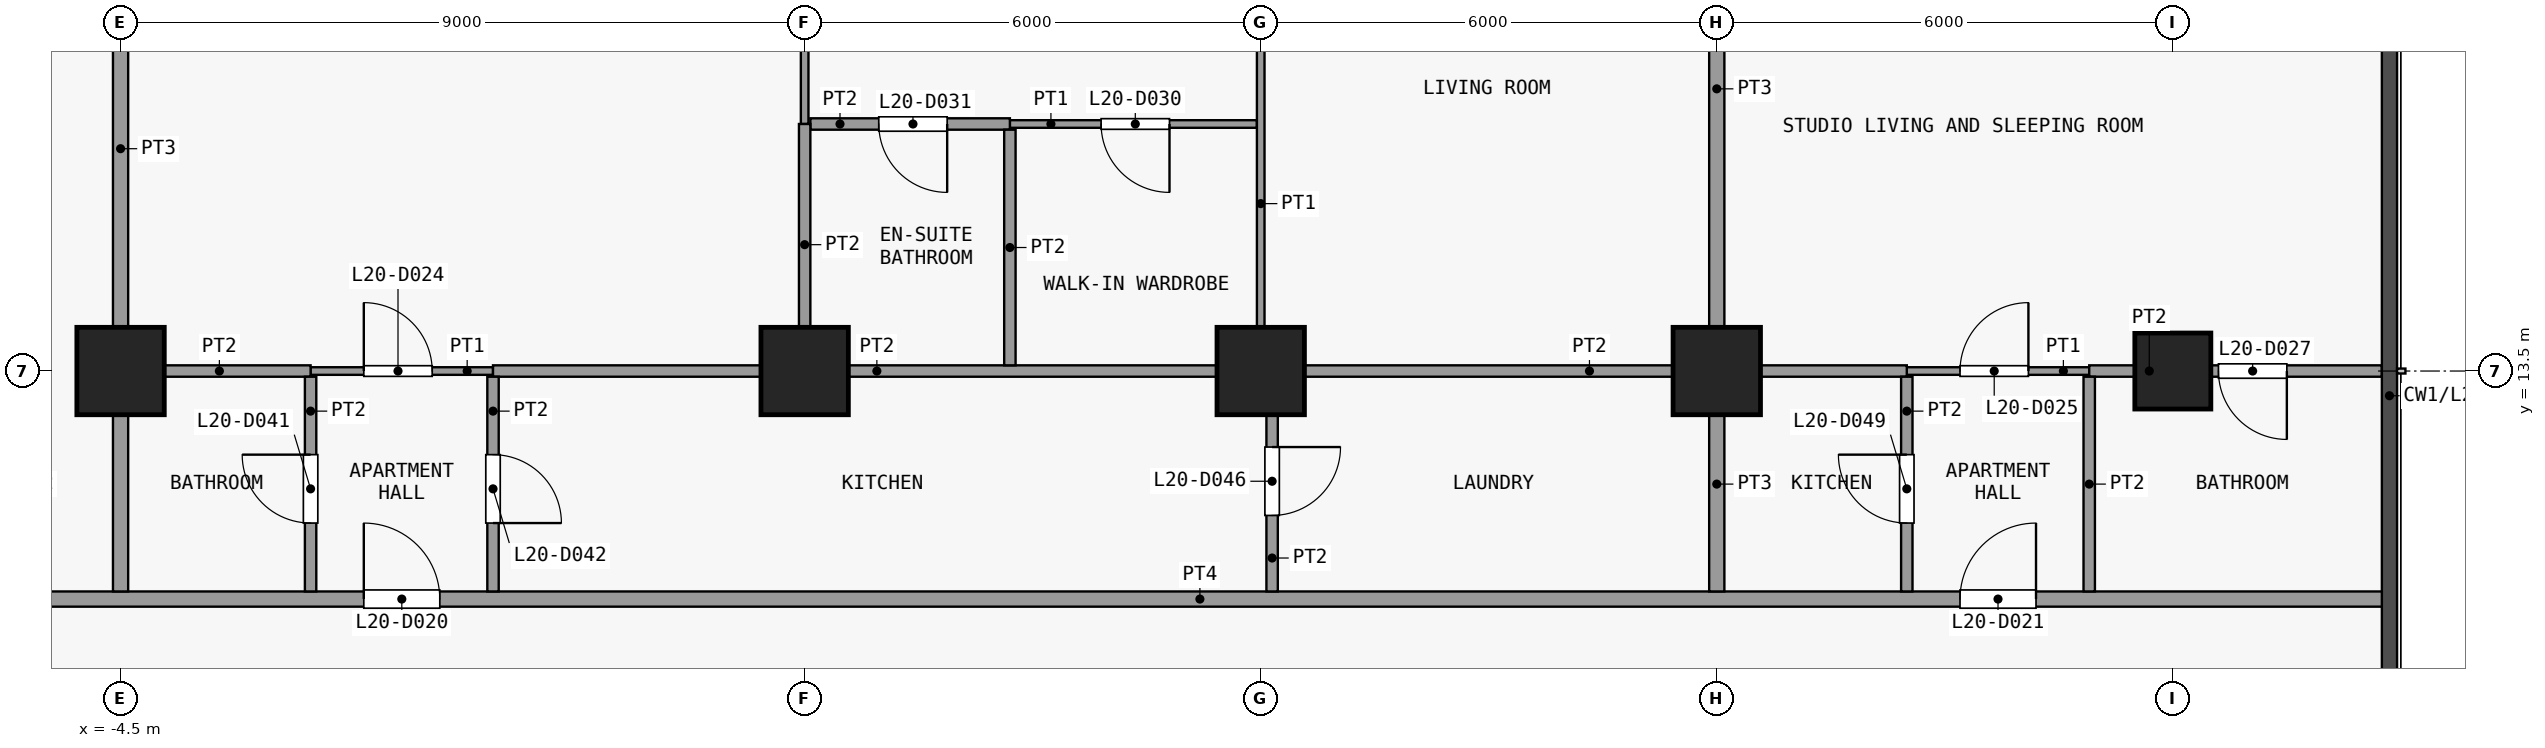
"""IFC4 building model, lengths in metres.
Left out: names, types, materials, properties, quantities, classifications, styles, units other than length and angle.
Written with IfcOpenShell. Run it as: python <this file> out.ifc"""

import sys

from ifc_helpers import new_model, si_unit, direction, frame, frame_2d, origin, origin_2d, place, context, subcontext, project, spatial, rectangle, extrude, element, fill, save


model = new_model("IFC4")
c1 = context("Model", 3, precision=1e-05, world=origin(), true_north=direction((0.0, 1.0)))
c2 = subcontext(c1, "Body", "Model", "MODEL_VIEW")
j1 = project(units=[si_unit("LENGTHUNIT", "METRE"), si_unit("PLANEANGLEUNIT", "RADIAN")], contexts=[c1])
p1 = place(None, origin())
s1 = spatial("IfcSite", under=j1, at=p1, CompositionType="ELEMENT")
p2 = place(p1, origin())
s2 = spatial("IfcBuilding", under=s1, at=p2, CompositionType="ELEMENT")
p3 = place(p2, frame((0.0, 0.0, 84.7)))
s3 = spatial("IfcBuildingStorey", under=s2, at=p3, CompositionType="ELEMENT", Elevation=84.7)
for number, where, z_axis, x_axis in (
    (1, (-4.5, 13.5, 0.0), (0.0, 0.0, 1.0), (1.0, 0.0, 0.0)),
    (2, (4.5, 13.5, 0.0), (0.0, 0.0, 1.0), (1.0, 0.0, 0.0)),
    (3, (10.5, 13.5, 0.0), (0.0, 0.0, 1.0), (1.0, 0.0, 0.0)),
    (4, (16.5, 13.5, 0.0), (0.0, 0.0, 1.0), (1.0, 0.0, 0.0)),
):
    element("IfcColumn", number, at=place(p3, frame(where, z_axis=z_axis, x_axis=x_axis)), inside=s3, PredefinedType="COLUMN", context=c2, shape_type="SweptSolid", body=[
        extrude(rectangle(XDim=1.15, YDim=1.15, at=origin_2d()), origin(), (0.0, 0.0, 1.0), 3.6),
    ])
p4 = place(p3, frame((22.5, 13.5, 0.0), z_axis=(0.0, 0.0, 1.0), x_axis=(1.0, 0.0, 0.0)))
e5 = element("IfcColumn", 5, at=p4, inside=s3, PredefinedType="COLUMN", context=c2, shape_type="SweptSolid", body=[
    extrude(rectangle(XDim=1.0, YDim=1.0, at=origin_2d()), origin(), (0.0, 0.0, 1.0), 3.6),
])
p5 = place(p3, frame((-23.85, 10.5, 0.0), z_axis=(0.0, 0.0, 1.0), x_axis=(1.0, 0.0, 0.0)))
e6 = element("IfcWall", 6, at=p5, inside=s3, PredefinedType="PARTITIONING", context=c2, shape_type="SweptSolid", body=[
    extrude(rectangle(XDim=49.2, YDim=0.2, at=frame_2d((24.6, 0.0))), origin(), (0.0, 0.0, 1.0), 3.3),
])
p6 = place(p5, frame((5.55, 0.0, 0.0)))
e7 = element("IfcOpeningElement", 7, at=p6, cuts=e6, PredefinedType="OPENING", context=c2, shape_type="SweptSolid", body=[
    extrude(rectangle(XDim=1.0, YDim=2.1, at=frame_2d((0.5, 1.05))), frame((0.0, 0.11, 0.0), z_axis=(0.0, -1.0, 0.0), x_axis=(1.0, 0.0, 0.0)), (0.0, 0.0, 1.0), 0.22),
])
p7 = place(p5, frame((14.05, 0.0, 0.0)))
e8 = element("IfcOpeningElement", 8, at=p7, cuts=e6, PredefinedType="OPENING", context=c2, shape_type="SweptSolid", body=[
    extrude(rectangle(XDim=1.0, YDim=2.1, at=frame_2d((0.5, 1.05))), frame((0.0, 0.11, 0.0), z_axis=(0.0, -1.0, 0.0), x_axis=(1.0, 0.0, 0.0)), (0.0, 0.0, 1.0), 0.22),
])
p8 = place(p5, frame((22.55, 0.0, 0.0)))
e9 = element("IfcOpeningElement", 9, at=p8, cuts=e6, PredefinedType="OPENING", context=c2, shape_type="SweptSolid", body=[
    extrude(rectangle(XDim=1.0, YDim=2.1, at=frame_2d((0.5, 1.05))), frame((0.0, 0.11, 0.0), z_axis=(0.0, -1.0, 0.0), x_axis=(1.0, 0.0, 0.0)), (0.0, 0.0, 1.0), 0.22),
])
p9 = place(p5, frame((43.55, 0.0, 0.0)))
e10 = element("IfcOpeningElement", 10, at=p9, cuts=e6, PredefinedType="OPENING", context=c2, shape_type="SweptSolid", body=[
    extrude(rectangle(XDim=1.0, YDim=2.1, at=frame_2d((0.5, 1.05))), frame((0.0, 0.11, 0.0), z_axis=(0.0, -1.0, 0.0), x_axis=(1.0, 0.0, 0.0)), (0.0, 0.0, 1.0), 0.22),
])
p10 = place(p3, frame((-2.0, 13.5, 0.0), z_axis=(0.0, 0.0, 1.0), x_axis=(1.0, 0.0, 0.0)))
e11 = element("IfcWall", 11, at=p10, inside=s3, PredefinedType="PARTITIONING", context=c2, shape_type="SweptSolid", body=[
    extrude(rectangle(XDim=2.4, YDim=0.1, at=frame_2d((1.2, 0.0))), origin(), (0.0, 0.0, 1.0), 3.3),
])
p11 = place(p10, frame((0.7, 0.0, 0.0)))
e12 = element("IfcOpeningElement", 12, at=p11, cuts=e11, PredefinedType="OPENING", context=c2, shape_type="SweptSolid", body=[
    extrude(rectangle(XDim=0.9, YDim=2.1, at=frame_2d((0.45, 1.05))), frame((0.0, 0.06, 0.0), z_axis=(0.0, -1.0, 0.0), x_axis=(1.0, 0.0, 0.0)), (0.0, 0.0, 1.0), 0.12),
])
p12 = place(p3, frame((19.0, 13.5, 0.0), z_axis=(0.0, 0.0, 1.0), x_axis=(1.0, 0.0, 0.0)))
e13 = element("IfcWall", 13, at=p12, inside=s3, PredefinedType="PARTITIONING", context=c2, shape_type="SweptSolid", body=[
    extrude(rectangle(XDim=2.4, YDim=0.1, at=frame_2d((1.2, 0.0))), origin(), (0.0, 0.0, 1.0), 3.3),
])
p13 = place(p12, frame((0.7, 0.0, 0.0)))
e14 = element("IfcOpeningElement", 14, at=p13, cuts=e13, PredefinedType="OPENING", context=c2, shape_type="SweptSolid", body=[
    extrude(rectangle(XDim=0.9, YDim=2.1, at=frame_2d((0.45, 1.05))), frame((0.0, 0.06, 0.0), z_axis=(0.0, -1.0, 0.0), x_axis=(1.0, 0.0, 0.0)), (0.0, 0.0, 1.0), 0.12),
])
p14 = place(p3, frame((-4.4, 13.5, 0.0), z_axis=(0.0, 0.0, 1.0), x_axis=(1.0, 0.0, 0.0)))
e15 = element("IfcWall", 15, at=p14, inside=s3, PredefinedType="PARTITIONING", context=c2, shape_type="SweptSolid", body=[
    extrude(rectangle(XDim=2.4, YDim=0.15, at=frame_2d((1.2, 0.0))), origin(), (0.0, 0.0, 1.0), 3.3),
])
p15 = place(p3, frame((0.4, 13.5, 0.0), z_axis=(0.0, 0.0, 1.0), x_axis=(1.0, 0.0, 0.0)))
e16 = element("IfcWall", 16, at=p15, inside=s3, PredefinedType="PARTITIONING", context=c2, shape_type="SweptSolid", body=[
    extrude(rectangle(XDim=10.1, YDim=0.15, at=frame_2d((5.05, 0.0))), origin(), (0.0, 0.0, 1.0), 3.3),
])
p16 = place(p3, frame((10.65, 13.5, 0.0), z_axis=(0.0, 0.0, 1.0), x_axis=(1.0, 0.0, 0.0)))
e17 = element("IfcWall", 17, at=p16, inside=s3, PredefinedType="PARTITIONING", context=c2, shape_type="SweptSolid", body=[
    extrude(rectangle(XDim=8.35, YDim=0.15, at=frame_2d((4.175, 0.0))), origin(), (0.0, 0.0, 1.0), 3.3),
])
p17 = place(p3, frame((21.4, 13.5, 0.0), z_axis=(0.0, 0.0, 1.0), x_axis=(1.0, 0.0, 0.0)))
e18 = element("IfcWall", 18, at=p17, inside=s3, PredefinedType="PARTITIONING", context=c2, shape_type="SweptSolid", body=[
    extrude(rectangle(XDim=3.85, YDim=0.15, at=frame_2d((1.925, 0.0))), origin(), (0.0, 0.0, 1.0), 3.3),
])
p18 = place(p17, frame((1.7, 0.0, 0.0)))
e19 = element("IfcOpeningElement", 19, at=p18, cuts=e18, PredefinedType="OPENING", context=c2, shape_type="SweptSolid", body=[
    extrude(rectangle(XDim=0.9, YDim=2.1, at=frame_2d((0.45, 1.05))), frame((0.0, 0.085, 0.0), z_axis=(0.0, -1.0, 0.0), x_axis=(1.0, 0.0, 0.0)), (0.0, 0.0, 1.0), 0.17),
])
p19 = place(p3, frame((7.2, 16.75, 0.0), z_axis=(0.0, 0.0, 1.0), x_axis=(1.0, 0.0, 0.0)))
e20 = element("IfcWall", 20, at=p19, inside=s3, PredefinedType="PARTITIONING", context=c2, shape_type="SweptSolid", body=[
    extrude(rectangle(XDim=3.25, YDim=0.1, at=frame_2d((1.625, 0.0))), origin(), (0.0, 0.0, 1.0), 3.3),
])
p20 = place(p19, frame((1.2, 0.0, 0.0)))
e21 = element("IfcOpeningElement", 21, at=p20, cuts=e20, PredefinedType="OPENING", context=c2, shape_type="SweptSolid", body=[
    extrude(rectangle(XDim=0.9, YDim=2.1, at=frame_2d((0.45, 1.05))), frame((0.0, 0.06, 0.0), z_axis=(0.0, -1.0, 0.0), x_axis=(1.0, 0.0, 0.0)), (0.0, 0.0, 1.0), 0.12),
])
p21 = place(p3, frame((4.575, 16.75, 0.0), z_axis=(0.0, 0.0, 1.0), x_axis=(1.0, 0.0, 0.0)))
e22 = element("IfcWall", 22, at=p21, inside=s3, PredefinedType="PARTITIONING", context=c2, shape_type="SweptSolid", body=[
    extrude(rectangle(XDim=2.625, YDim=0.15, at=frame_2d((1.312, 0.0))), origin(), (0.0, 0.0, 1.0), 3.3),
])
p22 = place(p21, frame((0.9, 0.0, 0.0)))
e23 = element("IfcOpeningElement", 23, at=p22, cuts=e22, PredefinedType="OPENING", context=c2, shape_type="SweptSolid", body=[
    extrude(rectangle(XDim=0.9, YDim=2.1, at=frame_2d((0.45, 1.05))), frame((0.0, 0.085, 0.0), z_axis=(0.0, -1.0, 0.0), x_axis=(1.0, 0.0, 0.0)), (0.0, 0.0, 1.0), 0.17),
])
p23 = place(p3, frame((-4.5, 10.6, 0.0), z_axis=(0.0, 0.0, 1.0), x_axis=(0.0, 1.0, 0.0)))
e24 = element("IfcWall", 24, at=p23, inside=s3, PredefinedType="PARTITIONING", context=c2, shape_type="SweptSolid", body=[
    extrude(rectangle(XDim=11.65, YDim=0.2, at=frame_2d((5.825, 0.0))), origin(), (0.0, 0.0, 1.0), 3.3),
])
p24 = place(p3, frame((-2.0, 10.6, 0.0), z_axis=(0.0, 0.0, 1.0), x_axis=(0.0, 1.0, 0.0)))
e25 = element("IfcWall", 25, at=p24, inside=s3, PredefinedType="PARTITIONING", context=c2, shape_type="SweptSolid", body=[
    extrude(rectangle(XDim=2.825, YDim=0.15, at=frame_2d((1.413, 0.0))), origin(), (0.0, 0.0, 1.0), 3.3),
])
p25 = place(p24, frame((0.9, 0.0, 0.0)))
e26 = element("IfcOpeningElement", 26, at=p25, cuts=e25, PredefinedType="OPENING", context=c2, shape_type="SweptSolid", body=[
    extrude(rectangle(XDim=0.9, YDim=2.1, at=frame_2d((0.45, 1.05))), frame((0.0, 0.085, 0.0), z_axis=(0.0, -1.0, 0.0), x_axis=(1.0, 0.0, 0.0)), (0.0, 0.0, 1.0), 0.17),
])
p26 = place(p3, frame((0.4, 10.6, 0.0), z_axis=(0.0, 0.0, 1.0), x_axis=(0.0, 1.0, 0.0)))
e27 = element("IfcWall", 27, at=p26, inside=s3, PredefinedType="PARTITIONING", context=c2, shape_type="SweptSolid", body=[
    extrude(rectangle(XDim=2.825, YDim=0.15, at=frame_2d((1.413, 0.0))), origin(), (0.0, 0.0, 1.0), 3.3),
])
p27 = place(p26, frame((0.9, 0.0, 0.0)))
e28 = element("IfcOpeningElement", 28, at=p27, cuts=e27, PredefinedType="OPENING", context=c2, shape_type="SweptSolid", body=[
    extrude(rectangle(XDim=0.9, YDim=2.1, at=frame_2d((0.45, 1.05))), frame((0.0, 0.085, 0.0), z_axis=(0.0, -1.0, 0.0), x_axis=(1.0, 0.0, 0.0)), (0.0, 0.0, 1.0), 0.17),
])
p28 = place(p3, frame((4.5, 16.75, 0.0), z_axis=(0.0, 0.0, 1.0), x_axis=(0.0, 1.0, 0.0)))
e29 = element("IfcWall", 29, at=p28, inside=s3, PredefinedType="PARTITIONING", context=c2, shape_type="SweptSolid", body=[
    extrude(rectangle(XDim=5.5, YDim=0.1, at=frame_2d((2.75, 0.0))), origin(), (0.0, 0.0, 1.0), 3.3),
])
p29 = place(p28, frame((3.4, 0.0, 0.0)))
e30 = element("IfcOpeningElement", 30, at=p29, cuts=e29, PredefinedType="OPENING", context=c2, shape_type="SweptSolid", body=[
    extrude(rectangle(XDim=0.9, YDim=2.1, at=frame_2d((0.45, 1.05))), frame((0.0, 0.06, 0.0), z_axis=(0.0, -1.0, 0.0), x_axis=(1.0, 0.0, 0.0)), (0.0, 0.0, 1.0), 0.12),
])
p30 = place(p3, frame((4.5, 13.575, 0.0), z_axis=(0.0, 0.0, 1.0), x_axis=(0.0, 1.0, 0.0)))
e31 = element("IfcWall", 31, at=p30, inside=s3, PredefinedType="PARTITIONING", context=c2, shape_type="SweptSolid", body=[
    extrude(rectangle(XDim=3.175, YDim=0.15, at=frame_2d((1.587, 0.0))), origin(), (0.0, 0.0, 1.0), 3.3),
])
p31 = place(p3, frame((7.2, 13.575, 0.0), z_axis=(0.0, 0.0, 1.0), x_axis=(0.0, 1.0, 0.0)))
e32 = element("IfcWall", 32, at=p31, inside=s3, PredefinedType="PARTITIONING", context=c2, shape_type="SweptSolid", body=[
    extrude(rectangle(XDim=3.1, YDim=0.15, at=frame_2d((1.55, 0.0))), origin(), (0.0, 0.0, 1.0), 3.3),
])
p32 = place(p3, frame((10.5, 13.575, 0.0), z_axis=(0.0, 0.0, 1.0), x_axis=(0.0, 1.0, 0.0)))
e33 = element("IfcWall", 33, at=p32, inside=s3, PredefinedType="PARTITIONING", context=c2, shape_type="SweptSolid", body=[
    extrude(rectangle(XDim=7.275, YDim=0.1, at=frame_2d((3.638, 0.0))), origin(), (0.0, 0.0, 1.0), 3.3),
])
p33 = place(p32, frame((4.375, 0.0, 0.0)))
e34 = element("IfcOpeningElement", 34, at=p33, cuts=e33, PredefinedType="OPENING", context=c2, shape_type="SweptSolid", body=[
    extrude(rectangle(XDim=0.9, YDim=2.1, at=frame_2d((0.45, 1.05))), frame((0.0, 0.06, 0.0), z_axis=(0.0, -1.0, 0.0), x_axis=(1.0, 0.0, 0.0)), (0.0, 0.0, 1.0), 0.12),
])
p34 = place(p3, frame((10.65, 10.6, 0.0), z_axis=(0.0, 0.0, 1.0), x_axis=(0.0, 1.0, 0.0)))
e35 = element("IfcWall", 35, at=p34, inside=s3, PredefinedType="PARTITIONING", context=c2, shape_type="SweptSolid", body=[
    extrude(rectangle(XDim=2.825, YDim=0.15, at=frame_2d((1.413, 0.0))), origin(), (0.0, 0.0, 1.0), 3.3),
])
p35 = place(p34, frame((1.0, 0.0, 0.0)))
e36 = element("IfcOpeningElement", 36, at=p35, cuts=e35, PredefinedType="OPENING", context=c2, shape_type="SweptSolid", body=[
    extrude(rectangle(XDim=0.9, YDim=2.1, at=frame_2d((0.45, 1.05))), frame((0.0, 0.085, 0.0), z_axis=(0.0, -1.0, 0.0), x_axis=(1.0, 0.0, 0.0)), (0.0, 0.0, 1.0), 0.17),
])
p36 = place(p3, frame((16.5, 10.6, 0.0), z_axis=(0.0, 0.0, 1.0), x_axis=(0.0, 1.0, 0.0)))
e37 = element("IfcWall", 37, at=p36, inside=s3, PredefinedType="PARTITIONING", context=c2, shape_type="SweptSolid", body=[
    extrude(rectangle(XDim=2.825, YDim=0.2, at=frame_2d((1.413, 0.0))), origin(), (0.0, 0.0, 1.0), 3.3),
])
p37 = place(p3, frame((16.5, 13.575, 0.0), z_axis=(0.0, 0.0, 1.0), x_axis=(0.0, 1.0, 0.0)))
e38 = element("IfcWall", 38, at=p37, inside=s3, PredefinedType="PARTITIONING", context=c2, shape_type="SweptSolid", body=[
    extrude(rectangle(XDim=7.275, YDim=0.2, at=frame_2d((3.638, 0.0))), origin(), (0.0, 0.0, 1.0), 3.3),
])
p38 = place(p3, frame((19.0, 10.6, 0.0), z_axis=(0.0, 0.0, 1.0), x_axis=(0.0, 1.0, 0.0)))
e39 = element("IfcWall", 39, at=p38, inside=s3, PredefinedType="PARTITIONING", context=c2, shape_type="SweptSolid", body=[
    extrude(rectangle(XDim=2.825, YDim=0.15, at=frame_2d((1.413, 0.0))), origin(), (0.0, 0.0, 1.0), 3.3),
])
p39 = place(p38, frame((0.9, 0.0, 0.0)))
e40 = element("IfcOpeningElement", 40, at=p39, cuts=e39, PredefinedType="OPENING", context=c2, shape_type="SweptSolid", body=[
    extrude(rectangle(XDim=0.9, YDim=2.1, at=frame_2d((0.45, 1.05))), frame((0.0, 0.085, 0.0), z_axis=(0.0, -1.0, 0.0), x_axis=(1.0, 0.0, 0.0)), (0.0, 0.0, 1.0), 0.17),
])
p40 = place(p3, frame((21.4, 10.6, 0.0), z_axis=(0.0, 0.0, 1.0), x_axis=(0.0, 1.0, 0.0)))
e41 = element("IfcWall", 41, at=p40, inside=s3, PredefinedType="PARTITIONING", context=c2, shape_type="SweptSolid", body=[
    extrude(rectangle(XDim=2.825, YDim=0.15, at=frame_2d((1.413, 0.0))), origin(), (0.0, 0.0, 1.0), 3.3),
])
p41 = place(p8, origin())
e42 = element("IfcDoor", 42, at=p41, inside=s3, OperationType="SINGLE_SWING_RIGHT", PredefinedType="DOOR", context=c2, shape_type="SweptSolid", body=[
    extrude(rectangle(XDim=1.0, YDim=2.1, at=frame_2d((0.5, 1.05))), frame((0.0, 0.025, 0.0), z_axis=(0.0, -1.0, 0.0), x_axis=(1.0, 0.0, 0.0)), (0.0, 0.0, 1.0), 0.05),
])
fill(e9, e42)
p42 = place(p9, origin())
e43 = element("IfcDoor", 43, at=p42, inside=s3, OperationType="SINGLE_SWING_LEFT", PredefinedType="DOOR", context=c2, shape_type="SweptSolid", body=[
    extrude(rectangle(XDim=1.0, YDim=2.1, at=frame_2d((0.5, 1.05))), frame((0.0, 0.025, 0.0), z_axis=(0.0, -1.0, 0.0), x_axis=(1.0, 0.0, 0.0)), (0.0, 0.0, 1.0), 0.05),
])
fill(e10, e43)
p43 = place(p11, origin())
e44 = element("IfcDoor", 44, at=p43, inside=s3, OperationType="SINGLE_SWING_RIGHT", PredefinedType="DOOR", context=c2, shape_type="SweptSolid", body=[
    extrude(rectangle(XDim=0.9, YDim=2.1, at=frame_2d((0.45, 1.05))), frame((0.0, 0.025, 0.0), z_axis=(0.0, -1.0, 0.0), x_axis=(1.0, 0.0, 0.0)), (0.0, 0.0, 1.0), 0.05),
])
fill(e12, e44)
p44 = place(p13, origin())
e45 = element("IfcDoor", 45, at=p44, inside=s3, OperationType="SINGLE_SWING_LEFT", PredefinedType="DOOR", context=c2, shape_type="SweptSolid", body=[
    extrude(rectangle(XDim=0.9, YDim=2.1, at=frame_2d((0.45, 1.05))), frame((0.0, 0.025, 0.0), z_axis=(0.0, -1.0, 0.0), x_axis=(1.0, 0.0, 0.0)), (0.0, 0.0, 1.0), 0.05),
])
fill(e14, e45)
p45 = place(p18, origin())
e46 = element("IfcDoor", 46, at=p45, inside=s3, OperationType="SINGLE_SWING_RIGHT", PredefinedType="DOOR", context=c2, shape_type="SweptSolid", body=[
    extrude(rectangle(XDim=0.9, YDim=2.1, at=frame_2d((0.45, 1.05))), frame((0.0, 0.025, 0.0), z_axis=(0.0, -1.0, 0.0), x_axis=(1.0, 0.0, 0.0)), (0.0, 0.0, 1.0), 0.05),
])
fill(e19, e46)
p46 = place(p20, origin())
e47 = element("IfcDoor", 47, at=p46, inside=s3, OperationType="SINGLE_SWING_RIGHT", PredefinedType="DOOR", context=c2, shape_type="SweptSolid", body=[
    extrude(rectangle(XDim=0.9, YDim=2.1, at=frame_2d((0.45, 1.05))), frame((0.0, 0.025, 0.0), z_axis=(0.0, -1.0, 0.0), x_axis=(1.0, 0.0, 0.0)), (0.0, 0.0, 1.0), 0.05),
])
fill(e21, e47)
p47 = place(p22, origin())
e48 = element("IfcDoor", 48, at=p47, inside=s3, OperationType="SINGLE_SWING_RIGHT", PredefinedType="DOOR", context=c2, shape_type="SweptSolid", body=[
    extrude(rectangle(XDim=0.9, YDim=2.1, at=frame_2d((0.45, 1.05))), frame((0.0, 0.025, 0.0), z_axis=(0.0, -1.0, 0.0), x_axis=(1.0, 0.0, 0.0)), (0.0, 0.0, 1.0), 0.05),
])
fill(e23, e48)
p48 = place(p25, origin())
e49 = element("IfcDoor", 49, at=p48, inside=s3, OperationType="SINGLE_SWING_LEFT", PredefinedType="DOOR", context=c2, shape_type="SweptSolid", body=[
    extrude(rectangle(XDim=0.9, YDim=2.1, at=frame_2d((0.45, 1.05))), frame((0.0, 0.025, 0.0), z_axis=(0.0, -1.0, 0.0), x_axis=(1.0, 0.0, 0.0)), (0.0, 0.0, 1.0), 0.05),
])
fill(e26, e49)
p49 = place(p27, origin())
e50 = element("IfcDoor", 50, at=p49, inside=s3, OperationType="SINGLE_SWING_LEFT", PredefinedType="DOOR", context=c2, shape_type="SweptSolid", body=[
    extrude(rectangle(XDim=0.9, YDim=2.1, at=frame_2d((0.45, 1.05))), frame((0.0, 0.025, 0.0), z_axis=(0.0, -1.0, 0.0), x_axis=(1.0, 0.0, 0.0)), (0.0, 0.0, 1.0), 0.05),
])
fill(e28, e50)
p50 = place(p35, origin())
e51 = element("IfcDoor", 51, at=p50, inside=s3, OperationType="SINGLE_SWING_RIGHT", PredefinedType="DOOR", context=c2, shape_type="SweptSolid", body=[
    extrude(rectangle(XDim=0.9, YDim=2.1, at=frame_2d((0.45, 1.05))), frame((0.0, 0.025, 0.0), z_axis=(0.0, -1.0, 0.0), x_axis=(1.0, 0.0, 0.0)), (0.0, 0.0, 1.0), 0.05),
])
fill(e36, e51)
p51 = place(p39, origin())
e52 = element("IfcDoor", 52, at=p51, inside=s3, OperationType="SINGLE_SWING_LEFT", PredefinedType="DOOR", context=c2, shape_type="SweptSolid", body=[
    extrude(rectangle(XDim=0.9, YDim=2.1, at=frame_2d((0.45, 1.05))), frame((0.0, 0.025, 0.0), z_axis=(0.0, -1.0, 0.0), x_axis=(1.0, 0.0, 0.0)), (0.0, 0.0, 1.0), 0.05),
])
fill(e40, e52)
save(model, sys.argv[1])
